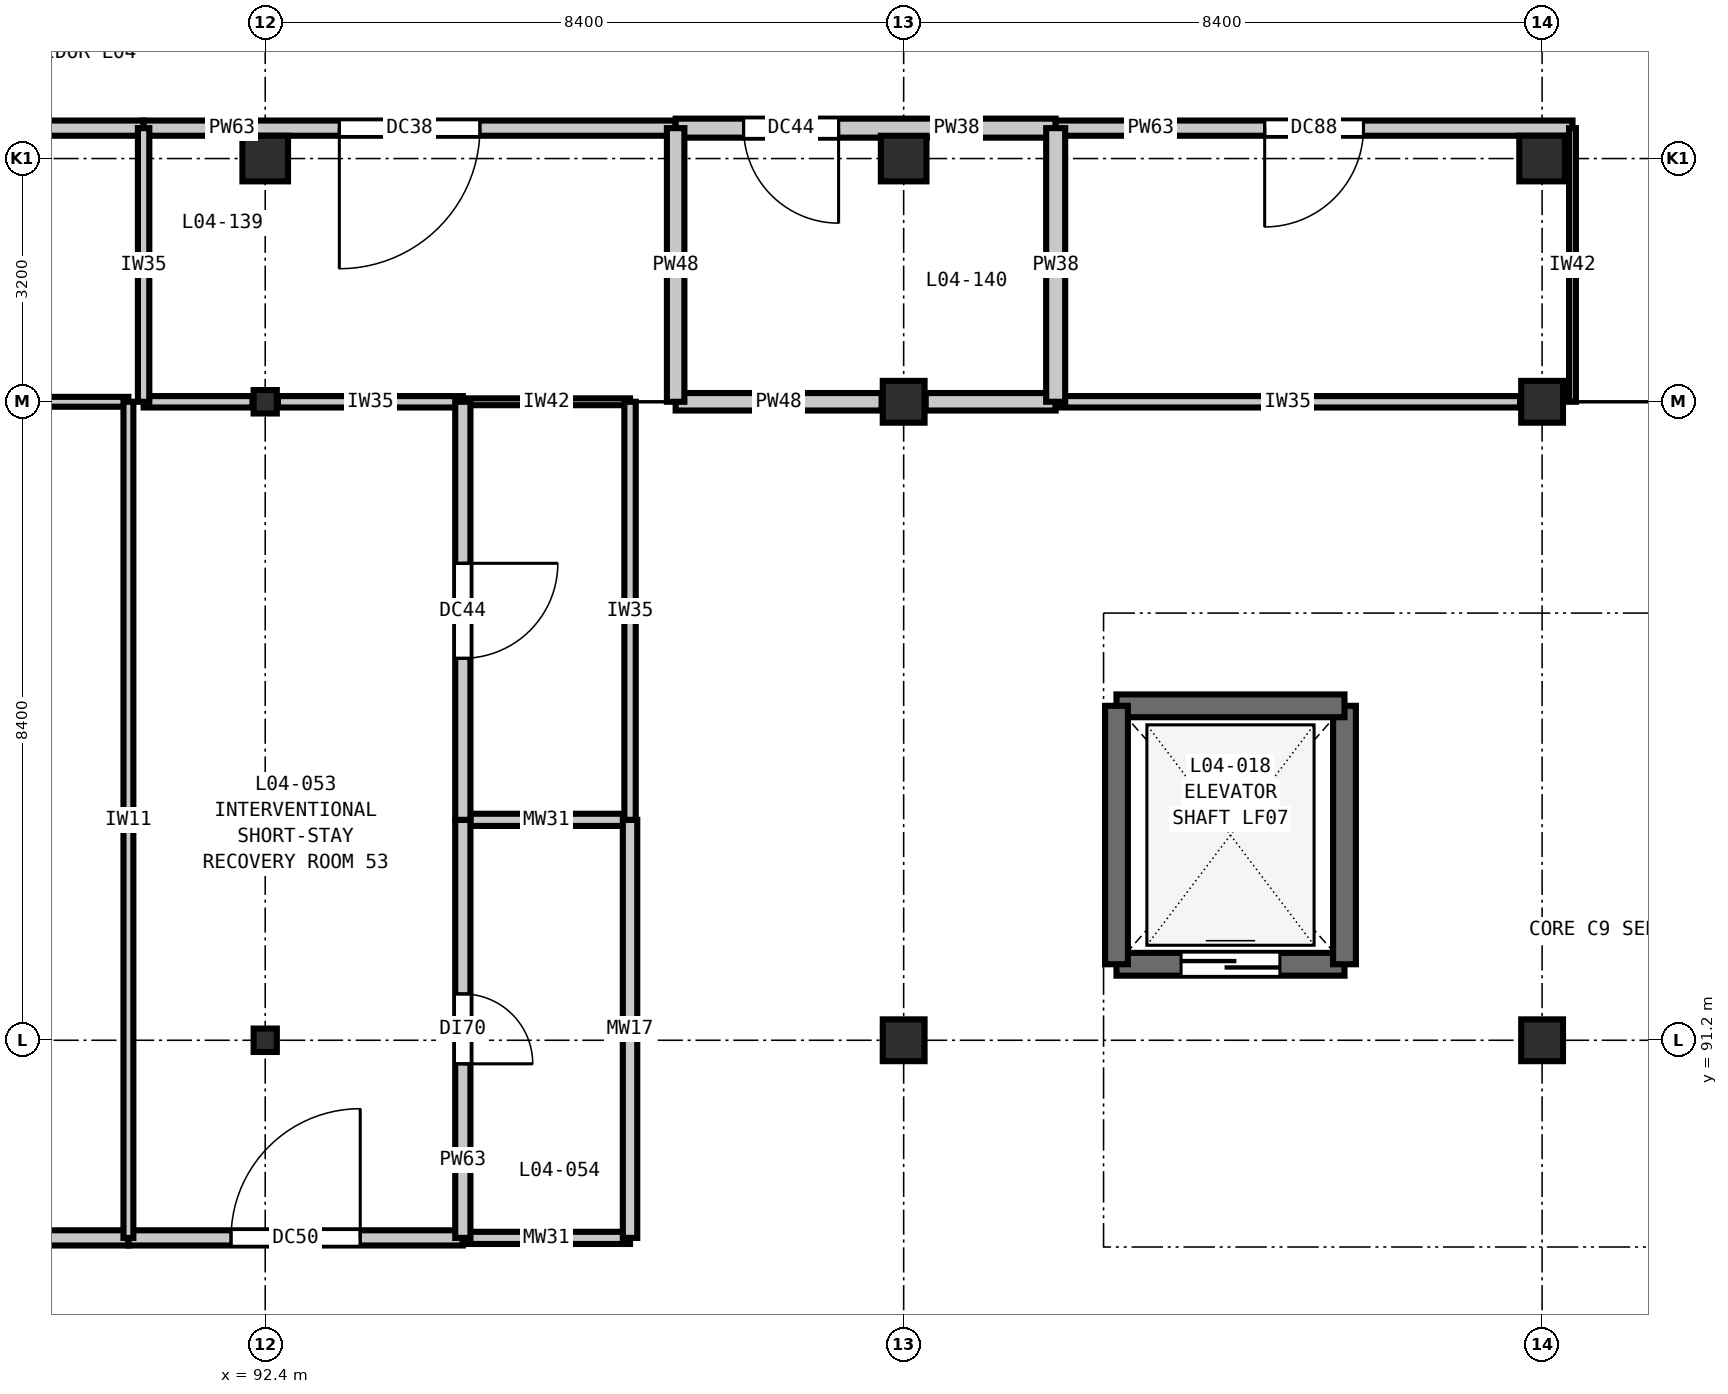
"""IFC4 building model, lengths in metres.
Left out: names, types, materials, properties, quantities, classifications, styles, units other than length and angle.
Written with IfcOpenShell. Run it as: python <this file> out.ifc"""

import sys

from ifc_helpers import new_model, si_unit, direction, frame, frame_2d, origin, origin_2d, place, context, subcontext, project, spatial, rectangle, i_section, extrude, element, fill, save


model = new_model("IFC4")
c1 = context("Model", 3, precision=1e-05, world=origin(), true_north=direction((0.0, 1.0)))
c2 = subcontext(c1, "Body", "Model", "MODEL_VIEW")
j1 = project(units=[si_unit("LENGTHUNIT", "METRE"), si_unit("PLANEANGLEUNIT", "RADIAN")], contexts=[c1])
p1 = place(None, origin())
s1 = spatial("IfcSite", under=j1, at=p1, CompositionType="ELEMENT")
p2 = place(p1, origin())
s2 = spatial("IfcBuilding", under=s1, at=p2, CompositionType="ELEMENT")
p3 = place(p2, frame((0.0, 0.0, 20.4)))
s3 = spatial("IfcBuildingStorey", under=s2, at=p3, CompositionType="ELEMENT", Elevation=20.4)
for number, where, z_axis, x_axis in (
    (1, (92.4, 91.2, 0.0), (0.0, 0.0, 1.0), (1.0, 0.0, 0.0)),
    (2, (92.4, 99.6, 0.0), (0.0, 0.0, 1.0), (1.0, 0.0, 0.0)),
):
    element("IfcColumn", number, at=place(p3, frame(where, z_axis=z_axis, x_axis=x_axis)), inside=s3, PredefinedType="COLUMN", context=c2, shape_type="SweptSolid", body=[
        extrude(i_section(OverallWidth=0.305, OverallDepth=0.308, WebThickness=0.01, FlangeThickness=0.015, FilletRadius=0.015, at=origin_2d()), origin(), (0.0, 0.0, 1.0), 4.2),
    ])
p4 = place(p3, frame((92.4, 102.8, 0.0), z_axis=(0.0, 0.0, 1.0), x_axis=(1.0, 0.0, 0.0)))
e3 = element("IfcColumn", 3, at=p4, inside=s3, PredefinedType="COLUMN", context=c2, shape_type="SweptSolid", body=[
    extrude(rectangle(XDim=0.6, YDim=0.6, at=origin_2d()), origin(), (0.0, 0.0, 1.0), 4.2),
])
for number, where, z_axis, x_axis in (
    (4, (100.8, 91.2, 0.0), (0.0, 0.0, 1.0), (1.0, 0.0, 0.0)),
    (5, (100.8, 99.6, 0.0), (0.0, 0.0, 1.0), (1.0, 0.0, 0.0)),
):
    element("IfcColumn", number, at=place(p3, frame(where, z_axis=z_axis, x_axis=x_axis)), inside=s3, PredefinedType="COLUMN", context=c2, shape_type="SweptSolid", body=[
        extrude(rectangle(XDim=0.55, YDim=0.55, at=origin_2d()), origin(), (0.0, 0.0, 1.0), 4.2),
    ])
p5 = place(p3, frame((100.8, 102.8, 0.0), z_axis=(0.0, 0.0, 1.0), x_axis=(1.0, 0.0, 0.0)))
e6 = element("IfcColumn", 6, at=p5, inside=s3, PredefinedType="COLUMN", context=c2, shape_type="SweptSolid", body=[
    extrude(rectangle(XDim=0.6, YDim=0.6, at=origin_2d()), origin(), (0.0, 0.0, 1.0), 4.2),
])
for number, where, z_axis, x_axis in (
    (7, (109.2, 91.2, 0.0), (0.0, 0.0, 1.0), (1.0, 0.0, 0.0)),
    (8, (109.2, 99.6, 0.0), (0.0, 0.0, 1.0), (1.0, 0.0, 0.0)),
):
    element("IfcColumn", number, at=place(p3, frame(where, z_axis=z_axis, x_axis=x_axis)), inside=s3, PredefinedType="COLUMN", context=c2, shape_type="SweptSolid", body=[
        extrude(rectangle(XDim=0.55, YDim=0.55, at=origin_2d()), origin(), (0.0, 0.0, 1.0), 4.2),
    ])
p6 = place(p3, frame((109.2, 102.8, 0.0), z_axis=(0.0, 0.0, 1.0), x_axis=(1.0, 0.0, 0.0)))
e9 = element("IfcColumn", 9, at=p6, inside=s3, PredefinedType="COLUMN", context=c2, shape_type="SweptSolid", body=[
    extrude(rectangle(XDim=0.6, YDim=0.6, at=origin_2d()), origin(), (0.0, 0.0, 1.0), 4.2),
])
p7 = place(p3, frame((103.6, 92.2, 0.0), z_axis=(0.0, 0.0, 1.0), x_axis=(1.0, 0.0, 0.0)))
e10 = element("IfcWall", 10, at=p7, inside=s3, PredefinedType="SHEAR", context=c2, shape_type="SweptSolid", body=[
    extrude(rectangle(XDim=3.0, YDim=0.3, at=frame_2d((1.5, 0.0))), origin(), (0.0, 0.0, 1.0), 4.2),
])
p8 = place(p7, frame((0.85, 0.0, 0.0)))
e11 = element("IfcOpeningElement", 11, at=p8, cuts=e10, PredefinedType="OPENING", context=c2, shape_type="SweptSolid", body=[
    extrude(rectangle(XDim=1.3, YDim=2.2, at=frame_2d((0.65, 1.1))), frame((0.0, 0.16, 0.0), z_axis=(0.0, -1.0, 0.0), x_axis=(1.0, 0.0, 0.0)), (0.0, 0.0, 1.0), 0.32),
])
p9 = place(p3, frame((106.6, 92.2, 0.0), z_axis=(0.0, 0.0, 1.0), x_axis=(0.0, 1.0, 0.0)))
e12 = element("IfcWall", 12, at=p9, inside=s3, PredefinedType="SHEAR", context=c2, shape_type="SweptSolid", body=[
    extrude(rectangle(XDim=3.4, YDim=0.3, at=frame_2d((1.7, 0.0))), origin(), (0.0, 0.0, 1.0), 4.2),
])
p10 = place(p3, frame((106.6, 95.6, 0.0), z_axis=(0.0, 0.0, 1.0), x_axis=(-1.0, 0.0, 0.0)))
e13 = element("IfcWall", 13, at=p10, inside=s3, PredefinedType="SHEAR", context=c2, shape_type="SweptSolid", body=[
    extrude(rectangle(XDim=3.0, YDim=0.3, at=frame_2d((1.5, 0.0))), origin(), (0.0, 0.0, 1.0), 4.2),
])
p11 = place(p3, frame((103.6, 95.6, 0.0), z_axis=(0.0, 0.0, 1.0), x_axis=(0.0, -1.0, 0.0)))
e14 = element("IfcWall", 14, at=p11, inside=s3, PredefinedType="SHEAR", context=c2, shape_type="SweptSolid", body=[
    extrude(rectangle(XDim=3.4, YDim=0.3, at=frame_2d((1.7, 0.0))), origin(), (0.0, 0.0, 1.0), 4.2),
])
p12 = place(p3, frame((82.2, 88.6, 0.0), z_axis=(0.0, 0.0, 1.0), x_axis=(1.0, 0.0, 0.0)))
e15 = element("IfcWall", 15, at=p12, inside=s3, PredefinedType="PARTITIONING", context=c2, shape_type="SweptSolid", body=[
    extrude(rectangle(XDim=8.4, YDim=0.2, at=frame_2d((4.2, 0.0))), origin(), (0.0, 0.0, 1.0), 3.82),
])
p13 = place(p12, frame((3.425, 0.0, 0.0)))
e16 = element("IfcOpeningElement", 16, at=p13, cuts=e15, PredefinedType="OPENING", context=c2, shape_type="SweptSolid", body=[
    extrude(rectangle(XDim=1.55, YDim=2.25, at=frame_2d((0.775, 1.125))), frame((0.0, 0.11, 0.0), z_axis=(0.0, -1.0, 0.0), x_axis=(1.0, 0.0, 0.0)), (0.0, 0.0, 1.0), 0.22),
])
p14 = place(p3, frame((90.6, 88.6, 0.0), z_axis=(0.0, 0.0, 1.0), x_axis=(1.0, 0.0, 0.0)))
e17 = element("IfcWall", 17, at=p14, inside=s3, PredefinedType="PARTITIONING", context=c2, shape_type="SweptSolid", body=[
    extrude(rectangle(XDim=4.4, YDim=0.2, at=frame_2d((2.2, 0.0))), origin(), (0.0, 0.0, 1.0), 3.82),
])
p15 = place(p14, frame((1.35, 0.0, 0.0)))
e18 = element("IfcOpeningElement", 18, at=p15, cuts=e17, PredefinedType="OPENING", context=c2, shape_type="SweptSolid", body=[
    extrude(rectangle(XDim=1.7, YDim=2.3, at=frame_2d((0.85, 1.15))), frame((0.0, 0.11, 0.0), z_axis=(0.0, -1.0, 0.0), x_axis=(1.0, 0.0, 0.0)), (0.0, 0.0, 1.0), 0.22),
])
for number, where, z_axis, x_axis in (
    (19, (95.0, 88.6, 0.0), (0.0, 0.0, 1.0), (1.0, 0.0, 0.0)),
    (20, (95.0, 94.1, 0.0), (0.0, 0.0, 1.0), (1.0, 0.0, 0.0)),
):
    element("IfcWall", number, at=place(p3, frame(where, z_axis=z_axis, x_axis=x_axis)), inside=s3, PredefinedType="PLUMBINGWALL", context=c2, shape_type="SweptSolid", body=[
        extrude(rectangle(XDim=2.2, YDim=0.16, at=frame_2d((1.1, 0.0))), origin(), (0.0, 0.0, 1.0), 3.82),
    ])
p16 = place(p3, frame((84.8, 99.6, 0.0), z_axis=(0.0, 0.0, 1.0), x_axis=(1.0, 0.0, 0.0)))
e21 = element("IfcWall", 21, at=p16, inside=s3, PredefinedType="PARTITIONING", context=c2, shape_type="SweptSolid", body=[
    extrude(rectangle(XDim=5.8, YDim=0.13, at=frame_2d((2.9, 0.0))), origin(), (0.0, 0.0, 1.0), 3.585),
])
p17 = place(p3, frame((92.567, 99.6, 0.0), z_axis=(0.0, 0.0, 1.0), x_axis=(1.0, 0.0, 0.0)))
e22 = element("IfcWall", 22, at=p17, inside=s3, PredefinedType="PARTITIONING", context=c2, shape_type="SweptSolid", body=[
    extrude(rectangle(XDim=2.433, YDim=0.15, at=frame_2d((1.216, 0.0))), origin(), (0.0, 0.0, 1.0), 3.585),
])
p18 = place(p3, frame((90.8, 99.6, 0.0), z_axis=(0.0, 0.0, 1.0), x_axis=(1.0, 0.0, 0.0)))
e23 = element("IfcWall", 23, at=p18, inside=s3, PredefinedType="PARTITIONING", context=c2, shape_type="SweptSolid", body=[
    extrude(rectangle(XDim=1.432, YDim=0.15, at=frame_2d((0.716, 0.0))), origin(), (0.0, 0.0, 1.0), 3.585),
])
p19 = place(p3, frame((95.0, 99.6, 0.0), z_axis=(0.0, 0.0, 1.0), x_axis=(1.0, 0.0, 0.0)))
e24 = element("IfcWall", 24, at=p19, inside=s3, PredefinedType="PARTITIONING", context=c2, shape_type="SweptSolid", body=[
    extrude(rectangle(XDim=2.2, YDim=0.09, at=frame_2d((1.1, 0.0))), origin(), (0.0, 0.0, 1.0), 3.585),
])
p20 = place(p3, frame((97.8, 99.6, 0.0), z_axis=(0.0, 0.0, 1.0), x_axis=(1.0, 0.0, 0.0)))
e25 = element("IfcWall", 25, at=p20, inside=s3, PredefinedType="PARTITIONING", context=c2, shape_type="SweptSolid", body=[
    extrude(rectangle(XDim=2.71, YDim=0.23, at=frame_2d((1.355, 0.0))), origin(), (0.0, 0.0, 1.0), 3.585),
])
p21 = place(p3, frame((101.09, 99.6, 0.0), z_axis=(0.0, 0.0, 1.0), x_axis=(1.0, 0.0, 0.0)))
e26 = element("IfcWall", 26, at=p21, inside=s3, PredefinedType="PARTITIONING", context=c2, shape_type="SweptSolid", body=[
    extrude(rectangle(XDim=1.71, YDim=0.23, at=frame_2d((0.855, 0.0))), origin(), (0.0, 0.0, 1.0), 3.585),
])
p22 = place(p3, frame((102.8, 99.6, 0.0), z_axis=(0.0, 0.0, 1.0), x_axis=(1.0, 0.0, 0.0)))
e27 = element("IfcWall", 27, at=p22, inside=s3, PredefinedType="PARTITIONING", context=c2, shape_type="SweptSolid", body=[
    extrude(rectangle(XDim=6.11, YDim=0.15, at=frame_2d((3.055, 0.0))), origin(), (0.0, 0.0, 1.0), 3.585),
])
p23 = place(p3, frame((84.8, 103.2, 0.0), z_axis=(0.0, 0.0, 1.0), x_axis=(1.0, 0.0, 0.0)))
e28 = element("IfcWall", 28, at=p23, inside=s3, PredefinedType="PARTITIONING", context=c2, shape_type="SweptSolid", body=[
    extrude(rectangle(XDim=6.0, YDim=0.2, at=frame_2d((3.0, 0.0))), origin(), (0.0, 0.0, 1.0), 3.82),
])
p24 = place(p23, frame((2.15, 0.0, 0.0)))
e29 = element("IfcOpeningElement", 29, at=p24, cuts=e28, PredefinedType="OPENING", context=c2, shape_type="SweptSolid", body=[
    extrude(rectangle(XDim=1.7, YDim=2.3, at=frame_2d((0.85, 1.15))), frame((0.0, 0.11, 0.0), z_axis=(0.0, -1.0, 0.0), x_axis=(1.0, 0.0, 0.0)), (0.0, 0.0, 1.0), 0.22),
])
p25 = place(p3, frame((90.8, 103.2, 0.0), z_axis=(0.0, 0.0, 1.0), x_axis=(1.0, 0.0, 0.0)))
e30 = element("IfcWall", 30, at=p25, inside=s3, PredefinedType="PARTITIONING", context=c2, shape_type="SweptSolid", body=[
    extrude(rectangle(XDim=7.0, YDim=0.2, at=frame_2d((3.5, 0.0))), origin(), (0.0, 0.0, 1.0), 3.82),
])
p26 = place(p25, frame((2.575, 0.0, 0.0)))
e31 = element("IfcOpeningElement", 31, at=p26, cuts=e30, PredefinedType="OPENING", context=c2, shape_type="SweptSolid", body=[
    extrude(rectangle(XDim=1.85, YDim=2.3, at=frame_2d((0.925, 1.15))), frame((0.0, 0.11, 0.0), z_axis=(0.0, -1.0, 0.0), x_axis=(1.0, 0.0, 0.0)), (0.0, 0.0, 1.0), 0.22),
])
p27 = place(p3, frame((97.8, 103.2, 0.0), z_axis=(0.0, 0.0, 1.0), x_axis=(1.0, 0.0, 0.0)))
e32 = element("IfcWall", 32, at=p27, inside=s3, PredefinedType="PARTITIONING", context=c2, shape_type="SweptSolid", body=[
    extrude(rectangle(XDim=5.0, YDim=0.25, at=frame_2d((2.5, 0.0))), origin(), (0.0, 0.0, 1.0), 3.82),
])
p28 = place(p27, frame((0.894, 0.0, 0.0)))
e33 = element("IfcOpeningElement", 33, at=p28, cuts=e32, PredefinedType="OPENING", context=c2, shape_type="SweptSolid", body=[
    extrude(rectangle(XDim=1.25, YDim=2.15, at=frame_2d((0.625, 1.075))), frame((0.0, 0.135, 0.0), z_axis=(0.0, -1.0, 0.0), x_axis=(1.0, 0.0, 0.0)), (0.0, 0.0, 1.0), 0.27),
])
p29 = place(p3, frame((102.8, 103.2, 0.0), z_axis=(0.0, 0.0, 1.0), x_axis=(1.0, 0.0, 0.0)))
e34 = element("IfcWall", 34, at=p29, inside=s3, PredefinedType="PARTITIONING", context=c2, shape_type="SweptSolid", body=[
    extrude(rectangle(XDim=6.8, YDim=0.2, at=frame_2d((3.4, 0.0))), origin(), (0.0, 0.0, 1.0), 3.82),
])
p30 = place(p29, frame((2.75, 0.0, 0.0)))
e35 = element("IfcOpeningElement", 35, at=p30, cuts=e34, PredefinedType="OPENING", context=c2, shape_type="SweptSolid", body=[
    extrude(rectangle(XDim=1.3, YDim=2.2, at=frame_2d((0.65, 1.1))), frame((0.0, 0.11, 0.0), z_axis=(0.0, -1.0, 0.0), x_axis=(1.0, 0.0, 0.0)), (0.0, 0.0, 1.0), 0.22),
])
p31 = place(p3, frame((90.6, 88.6, 0.0), z_axis=(0.0, 0.0, 1.0), x_axis=(0.0, 1.0, 0.0)))
e36 = element("IfcWall", 36, at=p31, inside=s3, PredefinedType="PARTITIONING", context=c2, shape_type="SweptSolid", body=[
    extrude(rectangle(XDim=11.0, YDim=0.13, at=frame_2d((5.5, 0.0))), origin(), (0.0, 0.0, 1.0), 3.82),
])
p32 = place(p3, frame((90.8, 99.6, 0.0), z_axis=(0.0, 0.0, 1.0), x_axis=(0.0, 1.0, 0.0)))
e37 = element("IfcWall", 37, at=p32, inside=s3, PredefinedType="PARTITIONING", context=c2, shape_type="SweptSolid", body=[
    extrude(rectangle(XDim=3.6, YDim=0.15, at=frame_2d((1.8, 0.0))), origin(), (0.0, 0.0, 1.0), 3.82),
])
p33 = place(p3, frame((95.0, 88.6, 0.0), z_axis=(0.0, 0.0, 1.0), x_axis=(0.0, 1.0, 0.0)))
e38 = element("IfcWall", 38, at=p33, inside=s3, PredefinedType="PARTITIONING", context=c2, shape_type="SweptSolid", body=[
    extrude(rectangle(XDim=5.5, YDim=0.2, at=frame_2d((2.75, 0.0))), origin(), (0.0, 0.0, 1.0), 3.82),
])
p34 = place(p33, frame((2.29, 0.0, 0.0)))
e39 = element("IfcOpeningElement", 39, at=p34, cuts=e38, PredefinedType="OPENING", context=c2, shape_type="SweptSolid", body=[
    extrude(rectangle(XDim=0.92, YDim=2.1, at=frame_2d((0.46, 1.05))), frame((0.0, 0.11, 0.0), z_axis=(0.0, -1.0, 0.0), x_axis=(1.0, 0.0, 0.0)), (0.0, 0.0, 1.0), 0.22),
])
p35 = place(p3, frame((95.0, 94.1, 0.0), z_axis=(0.0, 0.0, 1.0), x_axis=(0.0, 1.0, 0.0)))
e40 = element("IfcWall", 40, at=p35, inside=s3, PredefinedType="PARTITIONING", context=c2, shape_type="SweptSolid", body=[
    extrude(rectangle(XDim=5.5, YDim=0.2, at=frame_2d((2.75, 0.0))), origin(), (0.0, 0.0, 1.0), 3.82),
])
p36 = place(p35, frame((2.125, 0.0, 0.0)))
e41 = element("IfcOpeningElement", 41, at=p36, cuts=e40, PredefinedType="OPENING", context=c2, shape_type="SweptSolid", body=[
    extrude(rectangle(XDim=1.25, YDim=2.15, at=frame_2d((0.625, 1.075))), frame((0.0, 0.11, 0.0), z_axis=(0.0, -1.0, 0.0), x_axis=(1.0, 0.0, 0.0)), (0.0, 0.0, 1.0), 0.22),
])
p37 = place(p3, frame((97.2, 88.6, 0.0), z_axis=(0.0, 0.0, 1.0), x_axis=(0.0, 1.0, 0.0)))
e42 = element("IfcWall", 42, at=p37, inside=s3, PredefinedType="PLUMBINGWALL", context=c2, shape_type="SweptSolid", body=[
    extrude(rectangle(XDim=5.5, YDim=0.19, at=frame_2d((2.75, 0.0))), origin(), (0.0, 0.0, 1.0), 3.82),
])
p38 = place(p3, frame((97.2, 94.1, 0.0), z_axis=(0.0, 0.0, 1.0), x_axis=(0.0, 1.0, 0.0)))
e43 = element("IfcWall", 43, at=p38, inside=s3, PredefinedType="PARTITIONING", context=c2, shape_type="SweptSolid", body=[
    extrude(rectangle(XDim=5.5, YDim=0.15, at=frame_2d((2.75, 0.0))), origin(), (0.0, 0.0, 1.0), 3.82),
])
p39 = place(p3, frame((97.8, 99.6, 0.0), z_axis=(0.0, 0.0, 1.0), x_axis=(0.0, 1.0, 0.0)))
e44 = element("IfcWall", 44, at=p39, inside=s3, PredefinedType="PARTITIONING", context=c2, shape_type="SweptSolid", body=[
    extrude(rectangle(XDim=3.6, YDim=0.23, at=frame_2d((1.8, 0.0))), origin(), (0.0, 0.0, 1.0), 3.82),
])
p40 = place(p3, frame((102.8, 99.6, 0.0), z_axis=(0.0, 0.0, 1.0), x_axis=(0.0, 1.0, 0.0)))
e45 = element("IfcWall", 45, at=p40, inside=s3, PredefinedType="PARTITIONING", context=c2, shape_type="SweptSolid", body=[
    extrude(rectangle(XDim=3.6, YDim=0.25, at=frame_2d((1.8, 0.0))), origin(), (0.0, 0.0, 1.0), 3.82),
])
p41 = place(p3, frame((109.6, 99.6, 0.0), z_axis=(0.0, 0.0, 1.0), x_axis=(0.0, 1.0, 0.0)))
e46 = element("IfcWall", 46, at=p41, inside=s3, PredefinedType="PARTITIONING", context=c2, shape_type="SweptSolid", body=[
    extrude(rectangle(XDim=3.6, YDim=0.09, at=frame_2d((1.8, 0.0))), origin(), (0.0, 0.0, 1.0), 3.82),
])
p42 = place(p8, origin())
e47 = element("IfcDoor", 47, at=p42, inside=s3, OperationType="DOUBLE_DOOR_SLIDING", PredefinedType="DOOR", context=c2, shape_type="SweptSolid", body=[
    extrude(rectangle(XDim=1.3, YDim=2.2, at=frame_2d((0.65, 1.1))), frame((0.0, 0.025, 0.0), z_axis=(0.0, -1.0, 0.0), x_axis=(1.0, 0.0, 0.0)), (0.0, 0.0, 1.0), 0.05),
])
fill(e11, e47)
p43 = place(p15, origin())
e48 = element("IfcDoor", 48, at=p43, inside=s3, OperationType="SINGLE_SWING_RIGHT", PredefinedType="DOOR", context=c2, shape_type="SweptSolid", body=[
    extrude(rectangle(XDim=1.7, YDim=2.3, at=frame_2d((0.85, 1.15))), frame((0.0, 0.025, 0.0), z_axis=(0.0, -1.0, 0.0), x_axis=(1.0, 0.0, 0.0)), (0.0, 0.0, 1.0), 0.05),
])
fill(e18, e48)
p44 = place(p26, frame((1.85, 0.0, 0.0), z_axis=(0.0, 0.0, 1.0), x_axis=(-1.0, 0.0, 0.0)))
e49 = element("IfcDoor", 49, at=p44, inside=s3, OperationType="SINGLE_SWING_RIGHT", PredefinedType="DOOR", context=c2, shape_type="SweptSolid", body=[
    extrude(rectangle(XDim=1.85, YDim=2.3, at=frame_2d((0.925, 1.15))), frame((0.0, 0.025, 0.0), z_axis=(0.0, -1.0, 0.0), x_axis=(1.0, 0.0, 0.0)), (0.0, 0.0, 1.0), 0.05),
])
fill(e31, e49)
p45 = place(p28, frame((1.25, 0.0, 0.0), z_axis=(0.0, 0.0, 1.0), x_axis=(-1.0, 0.0, 0.0)))
e50 = element("IfcDoor", 50, at=p45, inside=s3, OperationType="SINGLE_SWING_LEFT", PredefinedType="DOOR", context=c2, shape_type="SweptSolid", body=[
    extrude(rectangle(XDim=1.25, YDim=2.15, at=frame_2d((0.625, 1.075))), frame((0.0, 0.025, 0.0), z_axis=(0.0, -1.0, 0.0), x_axis=(1.0, 0.0, 0.0)), (0.0, 0.0, 1.0), 0.05),
])
fill(e33, e50)
p46 = place(p30, frame((1.3, 0.0, 0.0), z_axis=(0.0, 0.0, 1.0), x_axis=(-1.0, 0.0, 0.0)))
e51 = element("IfcDoor", 51, at=p46, inside=s3, OperationType="SINGLE_SWING_RIGHT", PredefinedType="DOOR", context=c2, shape_type="SweptSolid", body=[
    extrude(rectangle(XDim=1.3, YDim=2.2, at=frame_2d((0.65, 1.1))), frame((0.0, 0.025, 0.0), z_axis=(0.0, -1.0, 0.0), x_axis=(1.0, 0.0, 0.0)), (0.0, 0.0, 1.0), 0.05),
])
fill(e35, e51)
p47 = place(p34, frame((0.92, 0.0, 0.0), z_axis=(0.0, 0.0, 1.0), x_axis=(-1.0, 0.0, 0.0)))
e52 = element("IfcDoor", 52, at=p47, inside=s3, OperationType="SINGLE_SWING_RIGHT", PredefinedType="DOOR", context=c2, shape_type="SweptSolid", body=[
    extrude(rectangle(XDim=0.92, YDim=2.1, at=frame_2d((0.46, 1.05))), frame((0.0, 0.025, 0.0), z_axis=(0.0, -1.0, 0.0), x_axis=(1.0, 0.0, 0.0)), (0.0, 0.0, 1.0), 0.05),
])
fill(e39, e52)
p48 = place(p36, frame((1.25, 0.0, 0.0), z_axis=(0.0, 0.0, 1.0), x_axis=(-1.0, 0.0, 0.0)))
e53 = element("IfcDoor", 53, at=p48, inside=s3, OperationType="SINGLE_SWING_LEFT", PredefinedType="DOOR", context=c2, shape_type="SweptSolid", body=[
    extrude(rectangle(XDim=1.25, YDim=2.15, at=frame_2d((0.625, 1.075))), frame((0.0, 0.025, 0.0), z_axis=(0.0, -1.0, 0.0), x_axis=(1.0, 0.0, 0.0)), (0.0, 0.0, 1.0), 0.05),
])
fill(e41, e53)
save(model, sys.argv[1])
